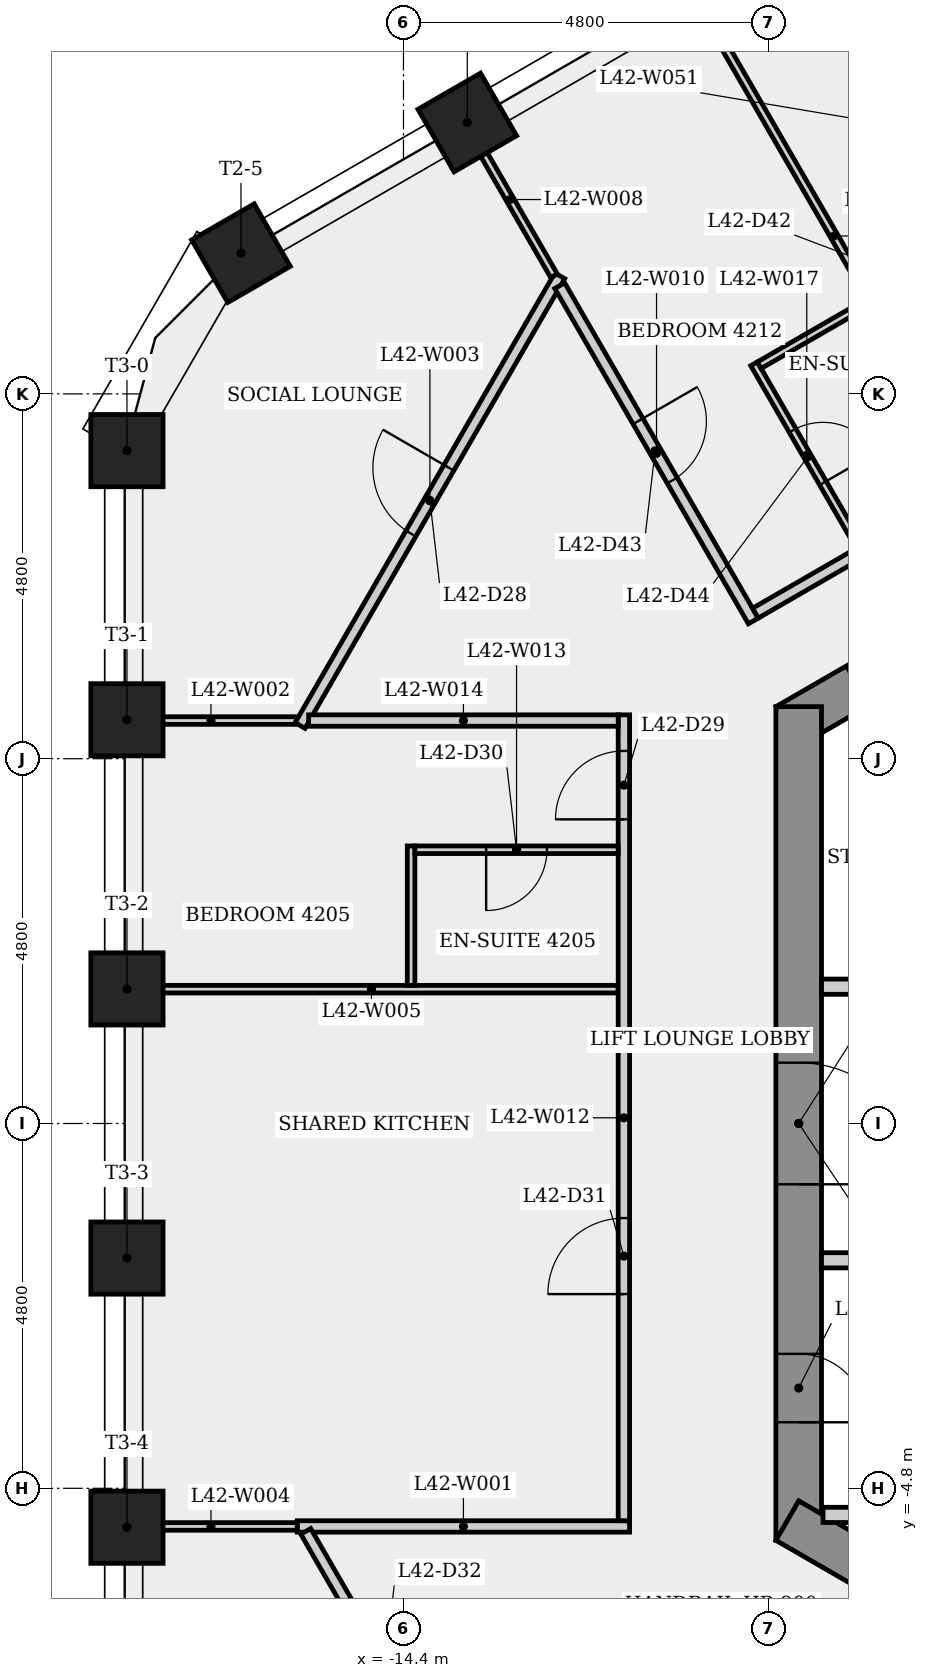
"""IFC4 building model, lengths in metres.
Left out: names, types, materials, properties, quantities, classifications, styles, units other than length and angle.
Written with IfcOpenShell. Run it as: python <this file> out.ifc"""

import sys

from ifc_helpers import new_model, si_unit, direction, frame, frame_2d, origin, origin_2d, place, context, subcontext, project, spatial, rectangle, extrude, element, fill, save


model = new_model("IFC4")
c1 = context("Model", 3, precision=1e-05, world=origin(), true_north=direction((0.0, 1.0)))
c2 = subcontext(c1, "Body", "Model", "MODEL_VIEW")
j1 = project(units=[si_unit("LENGTHUNIT", "METRE"), si_unit("PLANEANGLEUNIT", "RADIAN")], contexts=[c1])
p1 = place(None, origin())
s1 = spatial("IfcSite", under=j1, at=p1, CompositionType="ELEMENT")
p2 = place(p1, origin())
s2 = spatial("IfcBuilding", under=s1, at=p2, CompositionType="ELEMENT")
p3 = place(p2, frame((0.0, 0.0, 159.5)))
s3 = spatial("IfcBuildingStorey", under=s2, at=p3, CompositionType="ELEMENT", Elevation=159.5)
p4 = place(p3, frame((0.15, 10.71, 0.0), z_axis=(0.0, 0.0, 1.0), x_axis=(-0.866023993627, -0.500002442456, 0.0)))
e1 = element("IfcWall", 1, at=p4, inside=s3, PredefinedType="SHEAR", context=c2, shape_type="SweptSolid", body=[
    extrude(rectangle(XDim=10.97, YDim=0.6, at=frame_2d((5.485, 0.0))), origin(), (0.0, 0.0, 1.0), 3.4),
])
p5 = place(p4, frame((9.013, 0.0, 0.0)))
e2 = element("IfcOpeningElement", 2, at=p5, cuts=e1, PredefinedType="OPENING", context=c2, shape_type="SweptSolid", body=[
    extrude(rectangle(XDim=0.9, YDim=2.1, at=frame_2d((0.45, 1.05))), frame((0.0, 0.31, 0.0), z_axis=(0.0, -1.0, 0.0), x_axis=(1.0, 0.0, 0.0)), (0.0, 0.0, 1.0), 0.62),
])
p6 = place(p4, frame((2.437, 0.0, 0.0)))
e3 = element("IfcOpeningElement", 3, at=p6, cuts=e1, PredefinedType="OPENING", context=c2, shape_type="SweptSolid", body=[
    extrude(rectangle(XDim=0.9, YDim=2.1, at=frame_2d((0.45, 1.05))), frame((0.0, 0.31, 0.0), z_axis=(0.0, -1.0, 0.0), x_axis=(1.0, 0.0, 0.0)), (0.0, 0.0, 1.0), 0.62),
])
p7 = place(p3, frame((-9.2, 5.485, 0.0), z_axis=(0.0, 0.0, 1.0), x_axis=(0.0, -1.0, 0.0)))
e4 = element("IfcWall", 4, at=p7, inside=s3, PredefinedType="SHEAR", context=c2, shape_type="SweptSolid", body=[
    extrude(rectangle(XDim=10.97, YDim=0.6, at=frame_2d((5.485, 0.0))), origin(), (0.0, 0.0, 1.0), 3.4),
])
p8 = place(p7, frame((8.516, 0.0, 0.0)))
e5 = element("IfcOpeningElement", 5, at=p8, cuts=e4, PredefinedType="OPENING", context=c2, shape_type="SweptSolid", body=[
    extrude(rectangle(XDim=0.9, YDim=2.1, at=frame_2d((0.45, 1.05))), frame((0.0, 0.31, 0.0), z_axis=(0.0, -1.0, 0.0), x_axis=(1.0, 0.0, 0.0)), (0.0, 0.0, 1.0), 0.62),
])
p9 = place(p7, frame((4.685, 0.0, 0.0)))
e6 = element("IfcOpeningElement", 6, at=p9, cuts=e4, PredefinedType="OPENING", context=c2, shape_type="SweptSolid", body=[
    extrude(rectangle(XDim=1.6, YDim=2.1, at=frame_2d((0.8, 1.05))), frame((0.0, 0.31, 0.0), z_axis=(0.0, -1.0, 0.0), x_axis=(1.0, 0.0, 0.0)), (0.0, 0.0, 1.0), 0.62),
])
p10 = place(p3, frame((-9.35, -5.225, 0.0), z_axis=(0.0, 0.0, 1.0), x_axis=(0.866023993627, -0.500002442456, 0.0)))
e7 = element("IfcWall", 7, at=p10, inside=s3, PredefinedType="SHEAR", context=c2, shape_type="SweptSolid", body=[
    extrude(rectangle(XDim=10.97, YDim=0.6, at=frame_2d((5.485, 0.0))), origin(), (0.0, 0.0, 1.0), 3.4),
])
p11 = place(p10, frame((4.816, 0.0, 0.0)))
e8 = element("IfcOpeningElement", 8, at=p11, cuts=e7, PredefinedType="OPENING", context=c2, shape_type="SweptSolid", body=[
    extrude(rectangle(XDim=0.9, YDim=2.1, at=frame_2d((0.45, 1.05))), frame((0.0, 0.31, 0.0), z_axis=(0.0, -1.0, 0.0), x_axis=(1.0, 0.0, 0.0)), (0.0, 0.0, 1.0), 0.62),
])
for number, where, z_axis, x_axis in (
    (9, (-13.56, 13.171, 0.0), (0.0, 0.0, 1.0), (-0.5, 0.866, 0.0)),
    (10, (-16.538, 11.452, 0.0), (0.0, 0.0, 1.0), (-0.5, 0.866, 0.0)),
    (11, (-18.038, 8.854, 0.0), (0.0, 0.0, 1.0), (-1.0, 0.0, 0.0)),
    (12, (-18.038, 5.312, 0.0), (0.0, 0.0, 1.0), (-1.0, 0.0, 0.0)),
    (13, (-18.038, 1.771, 0.0), (0.0, 0.0, 1.0), (-1.0, 0.0, 0.0)),
    (14, (-18.038, -1.771, 0.0), (0.0, 0.0, 1.0), (-1.0, 0.0, 0.0)),
    (15, (-18.038, -5.312, 0.0), (0.0, 0.0, 1.0), (-1.0, 0.0, 0.0)),
):
    element("IfcColumn", number, at=place(p3, frame(where, z_axis=z_axis, x_axis=x_axis)), inside=s3, PredefinedType="COLUMN", context=c2, shape_type="SweptSolid", body=[
        extrude(rectangle(XDim=0.95, YDim=0.95, at=origin_2d()), origin(), (0.0, 0.0, 1.0), 3.4),
    ])
p12 = place(p3, frame((-15.798, -5.302, 0.0), z_axis=(0.0, 0.0, 1.0), x_axis=(1.0, 0.0, 0.0)))
e16 = element("IfcWall", 16, at=p12, inside=s3, PredefinedType="PARTITIONING", context=c2, shape_type="SweptSolid", body=[
    extrude(rectangle(XDim=4.373, YDim=0.15, at=frame_2d((2.187, 0.0))), origin(), (0.0, 0.0, 1.0), 3.05),
])
p13 = place(p3, frame((-15.798, 5.302, 0.0), z_axis=(0.0, 0.0, 1.0), x_axis=(-1.0, 0.0, 0.0)))
e17 = element("IfcWall", 17, at=p13, inside=s3, PredefinedType="PARTITIONING", context=c2, shape_type="SweptSolid", body=[
    extrude(rectangle(XDim=2.27, YDim=0.1, at=frame_2d((1.135, 0.0))), origin(), (0.0, 0.0, 1.0), 3.05),
])
p14 = place(p3, frame((-15.76, 5.237, 0.0), z_axis=(0.0, 0.0, 1.0), x_axis=(0.500009081712, 0.866020160392, 0.0)))
e18 = element("IfcWall", 18, at=p14, inside=s3, PredefinedType="PARTITIONING", context=c2, shape_type="SweptSolid", body=[
    extrude(rectangle(XDim=6.832, YDim=0.15, at=frame_2d((3.416, 0.0))), origin(), (0.0, 0.0, 1.0), 3.05),
])
p15 = place(p14, frame((2.916, 0.0, 0.0)))
e19 = element("IfcOpeningElement", 19, at=p15, cuts=e18, PredefinedType="OPENING", context=c2, shape_type="SweptSolid", body=[
    extrude(rectangle(XDim=1.0, YDim=2.1, at=frame_2d((0.5, 1.05))), frame((0.0, 0.085, 0.0), z_axis=(0.0, -1.0, 0.0), x_axis=(1.0, 0.0, 0.0)), (0.0, 0.0, 1.0), 0.17),
])
p16 = place(p3, frame((-15.798, -5.302, 0.0), z_axis=(0.0, 0.0, 1.0), x_axis=(-1.0, 0.0, 0.0)))
e20 = element("IfcWall", 20, at=p16, inside=s3, PredefinedType="PARTITIONING", context=c2, shape_type="SweptSolid", body=[
    extrude(rectangle(XDim=2.27, YDim=0.1, at=frame_2d((1.135, 0.0))), origin(), (0.0, 0.0, 1.0), 3.05),
])
p17 = place(p3, frame((-18.068, 1.767, 0.0), z_axis=(0.0, 0.0, 1.0), x_axis=(1.0, 0.0, 0.0)))
e21 = element("IfcWall", 21, at=p17, inside=s3, PredefinedType="PARTITIONING", context=c2, shape_type="SweptSolid", body=[
    extrude(rectangle(XDim=6.493, YDim=0.1, at=frame_2d((3.247, 0.0))), origin(), (0.0, 0.0, 1.0), 3.05),
])
p18 = place(p3, frame((-14.3, 3.652, 0.0), z_axis=(0.0, 0.0, 1.0), x_axis=(0.0, -1.0, 0.0)))
e22 = element("IfcWall", 22, at=p18, inside=s3, PredefinedType="PARTITIONING", context=c2, shape_type="SweptSolid", body=[
    extrude(rectangle(XDim=1.834, YDim=0.1, at=frame_2d((0.917, 0.0))), origin(), (0.0, 0.0, 1.0), 3.05),
])
p19 = place(p3, frame((-13.578, 13.161, 0.0), z_axis=(0.0, 0.0, 1.0), x_axis=(0.500014285048, -0.866017156151, 0.0)))
e23 = element("IfcWall", 23, at=p19, inside=s3, PredefinedType="PARTITIONING", context=c2, shape_type="SweptSolid", body=[
    extrude(rectangle(XDim=2.317, YDim=0.1, at=frame_2d((1.159, 0.0))), origin(), (0.0, 0.0, 1.0), 3.05),
])
p20 = place(p3, frame((-13.611, -8.959, 0.0), z_axis=(0.0, 0.0, 1.0), x_axis=(-0.499994179242, 0.866028764375, 0.0)))
e24 = element("IfcWall", 24, at=p20, inside=s3, PredefinedType="PARTITIONING", context=c2, shape_type="SweptSolid", body=[
    extrude(rectangle(XDim=4.148, YDim=0.15, at=frame_2d((2.074, 0.0))), origin(), (0.0, 0.0, 1.0), 3.05),
])
p21 = place(p20, frame((1.574, 0.0, 0.0)))
e25 = element("IfcOpeningElement", 25, at=p21, cuts=e24, PredefinedType="OPENING", context=c2, shape_type="SweptSolid", body=[
    extrude(rectangle(XDim=1.0, YDim=2.1, at=frame_2d((0.5, 1.05))), frame((0.0, 0.085, 0.0), z_axis=(0.0, -1.0, 0.0), x_axis=(1.0, 0.0, 0.0)), (0.0, 0.0, 1.0), 0.17),
])
p22 = place(p3, frame((-12.344, 11.024, 0.0), z_axis=(0.0, 0.0, 1.0), x_axis=(0.50001008724, -0.866019579835, 0.0)))
e26 = element("IfcWall", 26, at=p22, inside=s3, PredefinedType="PARTITIONING", context=c2, shape_type="SweptSolid", body=[
    extrude(rectangle(XDim=5.094, YDim=0.15, at=frame_2d((2.547, 0.0))), origin(), (0.0, 0.0, 1.0), 3.05),
])
p23 = place(p22, frame((2.06, 0.0, 0.0)))
e27 = element("IfcOpeningElement", 27, at=p23, cuts=e26, PredefinedType="OPENING", context=c2, shape_type="SweptSolid", body=[
    extrude(rectangle(XDim=0.9, YDim=2.1, at=frame_2d((0.45, 1.05))), frame((0.0, 0.085, 0.0), z_axis=(0.0, -1.0, 0.0), x_axis=(1.0, 0.0, 0.0)), (0.0, 0.0, 1.0), 0.17),
])
p24 = place(p3, frame((-11.5, -5.227, 0.0), z_axis=(0.0, 0.0, 1.0), x_axis=(0.0, 1.0, 0.0)))
e28 = element("IfcWall", 28, at=p24, inside=s3, PredefinedType="PARTITIONING", context=c2, shape_type="SweptSolid", body=[
    extrude(rectangle(XDim=10.604, YDim=0.15, at=frame_2d((5.302, 0.0))), origin(), (0.0, 0.0, 1.0), 3.05),
])
p25 = place(p24, frame((9.229, 0.0, 0.0)))
e29 = element("IfcOpeningElement", 29, at=p25, cuts=e28, PredefinedType="OPENING", context=c2, shape_type="SweptSolid", body=[
    extrude(rectangle(XDim=0.9, YDim=2.1, at=frame_2d((0.45, 1.05))), frame((0.0, 0.085, 0.0), z_axis=(0.0, -1.0, 0.0), x_axis=(1.0, 0.0, 0.0)), (0.0, 0.0, 1.0), 0.17),
])
p26 = place(p24, frame((2.982, 0.0, 0.0)))
e30 = element("IfcOpeningElement", 30, at=p26, cuts=e28, PredefinedType="OPENING", context=c2, shape_type="SweptSolid", body=[
    extrude(rectangle(XDim=1.0, YDim=2.1, at=frame_2d((0.5, 1.05))), frame((0.0, 0.085, 0.0), z_axis=(0.0, -1.0, 0.0), x_axis=(1.0, 0.0, 0.0)), (0.0, 0.0, 1.0), 0.17),
])
p27 = place(p3, frame((-11.575, 3.602, 0.0), z_axis=(0.0, 0.0, 1.0), x_axis=(-1.0, 0.0, 0.0)))
e31 = element("IfcWall", 31, at=p27, inside=s3, PredefinedType="PARTITIONING", context=c2, shape_type="SweptSolid", body=[
    extrude(rectangle(XDim=2.675, YDim=0.1, at=frame_2d((1.337, 0.0))), origin(), (0.0, 0.0, 1.0), 3.05),
])
p28 = place(p27, frame((0.938, 0.0, 0.0)))
e32 = element("IfcOpeningElement", 32, at=p28, cuts=e31, PredefinedType="OPENING", context=c2, shape_type="SweptSolid", body=[
    extrude(rectangle(XDim=0.8, YDim=2.1, at=frame_2d((0.4, 1.05))), frame((0.0, 0.06, 0.0), z_axis=(0.0, -1.0, 0.0), x_axis=(1.0, 0.0, 0.0)), (0.0, 0.0, 1.0), 0.12),
])
p29 = place(p3, frame((-11.575, 5.302, 0.0), z_axis=(0.0, 0.0, 1.0), x_axis=(-1.0, 0.0, 0.0)))
e33 = element("IfcWall", 33, at=p29, inside=s3, PredefinedType="PARTITIONING", context=c2, shape_type="SweptSolid", body=[
    extrude(rectangle(XDim=4.073, YDim=0.15, at=frame_2d((2.037, 0.0))), origin(), (0.0, 0.0, 1.0), 3.05),
])
p30 = place(p3, frame((-9.77, 6.715, 0.0), z_axis=(0.0, 0.0, 1.0), x_axis=(0.866022281964, 0.500005407112, 0.0)))
e34 = element("IfcWall", 34, at=p30, inside=s3, PredefinedType="PARTITIONING", context=c2, shape_type="SweptSolid", body=[
    extrude(rectangle(XDim=10.282, YDim=0.15, at=frame_2d((5.141, 0.0))), origin(), (0.0, 0.0, 1.0), 3.05),
])
p31 = place(p30, frame((3.777, 0.0, 0.0)))
e35 = element("IfcOpeningElement", 35, at=p31, cuts=e34, PredefinedType="OPENING", context=c2, shape_type="SweptSolid", body=[
    extrude(rectangle(XDim=0.9, YDim=2.1, at=frame_2d((0.45, 1.05))), frame((0.0, 0.085, 0.0), z_axis=(0.0, -1.0, 0.0), x_axis=(1.0, 0.0, 0.0)), (0.0, 0.0, 1.0), 0.17),
])
p32 = place(p3, frame((-9.788, 9.995, 0.0), z_axis=(0.0, 0.0, 1.0), x_axis=(0.50007530636, -0.865981921271, 0.0)))
e36 = element("IfcWall", 36, at=p32, inside=s3, PredefinedType="PARTITIONING", context=c2, shape_type="SweptSolid", body=[
    extrude(rectangle(XDim=2.775, YDim=0.1, at=frame_2d((1.387, 0.0))), origin(), (0.0, 0.0, 1.0), 3.05),
])
p33 = place(p32, frame((1.012, 0.0, 0.0)))
e37 = element("IfcOpeningElement", 37, at=p33, cuts=e36, PredefinedType="OPENING", context=c2, shape_type="SweptSolid", body=[
    extrude(rectangle(XDim=0.8, YDim=2.1, at=frame_2d((0.4, 1.05))), frame((0.0, 0.06, 0.0), z_axis=(0.0, -1.0, 0.0), x_axis=(1.0, 0.0, 0.0)), (0.0, 0.0, 1.0), 0.12),
])
p34 = place(p3, frame((-8.9, 1.8, 0.0), z_axis=(0.0, 0.0, 1.0), x_axis=(1.0, 0.0, 0.0)))
e38 = element("IfcWall", 38, at=p34, inside=s3, PredefinedType="PARTITIONING", context=c2, shape_type="SweptSolid", body=[
    extrude(rectangle(XDim=1.425, YDim=0.2, at=frame_2d((0.712, 0.0))), origin(), (0.0, 0.0, 1.0), 3.05),
])
p35 = place(p3, frame((-8.88, -5.15, 0.0), z_axis=(0.0, 0.0, 1.0), x_axis=(1.0, 0.0, 0.0)))
e39 = element("IfcWall", 39, at=p35, inside=s3, PredefinedType="PARTITIONING", context=c2, shape_type="SweptSolid", body=[
    extrude(rectangle(XDim=11.205, YDim=0.2, at=frame_2d((5.603, 0.0))), origin(), (0.0, 0.0, 1.0), 3.05),
])
p36 = place(p3, frame((-8.288, 10.803, 0.0), z_axis=(0.0, 0.0, 1.0), x_axis=(-0.866052736899, -0.499952654668, 0.0)))
e40 = element("IfcWall", 40, at=p36, inside=s3, PredefinedType="PARTITIONING", context=c2, shape_type="SweptSolid", body=[
    extrude(rectangle(XDim=1.653, YDim=0.1, at=frame_2d((0.826, 0.0))), origin(), (0.0, 0.0, 1.0), 3.05),
])
p37 = place(p3, frame((-10.588, 14.887, 0.0), z_axis=(0.0, 0.0, 1.0), x_axis=(0.499997136009, -0.866027057304, 0.0)))
e41 = element("IfcWall", 41, at=p37, inside=s3, PredefinedType="PARTITIONING", context=c2, shape_type="SweptSolid", body=[
    extrude(rectangle(XDim=7.412, YDim=0.1, at=frame_2d((3.706, 0.0))), origin(), (0.0, 0.0, 1.0), 3.05),
])
p38 = place(p3, frame((-8.9, -1.8, 0.0), z_axis=(0.0, 0.0, 1.0), x_axis=(1.0, 0.0, 0.0)))
e42 = element("IfcWall", 42, at=p38, inside=s3, PredefinedType="PARTITIONING", context=c2, shape_type="SweptSolid", body=[
    extrude(rectangle(XDim=11.225, YDim=0.2, at=frame_2d((5.613, 0.0))), origin(), (0.0, 0.0, 1.0), 3.05),
])
p39 = place(p38, frame((2.135, 0.0, 0.0)))
e43 = element("IfcOpeningElement", 43, at=p39, cuts=e42, PredefinedType="OPENING", context=c2, shape_type="SweptSolid", body=[
    extrude(rectangle(XDim=0.9, YDim=2.1, at=frame_2d((0.45, 1.05))), frame((0.0, 0.11, 0.0), z_axis=(0.0, -1.0, 0.0), x_axis=(1.0, 0.0, 0.0)), (0.0, 0.0, 1.0), 0.22),
])
p40 = place(p38, frame((6.61, 0.0, 0.0)))
e44 = element("IfcOpeningElement", 44, at=p40, cuts=e42, PredefinedType="OPENING", context=c2, shape_type="SweptSolid", body=[
    extrude(rectangle(XDim=0.9, YDim=2.1, at=frame_2d((0.45, 1.05))), frame((0.0, 0.11, 0.0), z_axis=(0.0, -1.0, 0.0), x_axis=(1.0, 0.0, 0.0)), (0.0, 0.0, 1.0), 0.22),
])
p41 = place(p38, frame((9.613, 0.0, 0.0)))
e45 = element("IfcOpeningElement", 45, at=p41, cuts=e42, PredefinedType="OPENING", context=c2, shape_type="SweptSolid", body=[
    extrude(rectangle(XDim=0.9, YDim=2.1, at=frame_2d((0.45, 1.05))), frame((0.0, 0.11, 0.0), z_axis=(0.0, -1.0, 0.0), x_axis=(1.0, 0.0, 0.0)), (0.0, 0.0, 1.0), 0.22),
])
p42 = place(p15, origin())
e46 = element("IfcDoor", 46, at=p42, inside=s3, OperationType="SINGLE_SWING_RIGHT", PredefinedType="DOOR", context=c2, shape_type="SweptSolid", body=[
    extrude(rectangle(XDim=1.0, YDim=2.1, at=frame_2d((0.5, 1.05))), frame((0.0, 0.025, 0.0), z_axis=(0.0, -1.0, 0.0), x_axis=(1.0, 0.0, 0.0)), (0.0, 0.0, 1.0), 0.05),
])
fill(e19, e46)
p43 = place(p25, origin())
e47 = element("IfcDoor", 47, at=p43, inside=s3, OperationType="SINGLE_SWING_LEFT", PredefinedType="DOOR", context=c2, shape_type="SweptSolid", body=[
    extrude(rectangle(XDim=0.9, YDim=2.1, at=frame_2d((0.45, 1.05))), frame((0.0, 0.025, 0.0), z_axis=(0.0, -1.0, 0.0), x_axis=(1.0, 0.0, 0.0)), (0.0, 0.0, 1.0), 0.05),
])
fill(e29, e47)
p44 = place(p28, origin())
e48 = element("IfcDoor", 48, at=p44, inside=s3, OperationType="SINGLE_SWING_RIGHT", PredefinedType="DOOR", context=c2, shape_type="SweptSolid", body=[
    extrude(rectangle(XDim=0.8, YDim=2.1, at=frame_2d((0.4, 1.05))), frame((0.0, 0.025, 0.0), z_axis=(0.0, -1.0, 0.0), x_axis=(1.0, 0.0, 0.0)), (0.0, 0.0, 1.0), 0.05),
])
fill(e32, e48)
p45 = place(p26, origin())
e49 = element("IfcDoor", 49, at=p45, inside=s3, OperationType="SINGLE_SWING_LEFT", PredefinedType="DOOR", context=c2, shape_type="SweptSolid", body=[
    extrude(rectangle(XDim=1.0, YDim=2.1, at=frame_2d((0.5, 1.05))), frame((0.0, 0.025, 0.0), z_axis=(0.0, -1.0, 0.0), x_axis=(1.0, 0.0, 0.0)), (0.0, 0.0, 1.0), 0.05),
])
fill(e30, e49)
p46 = place(p23, origin())
e50 = element("IfcDoor", 50, at=p46, inside=s3, OperationType="SINGLE_SWING_LEFT", PredefinedType="DOOR", context=c2, shape_type="SweptSolid", body=[
    extrude(rectangle(XDim=0.9, YDim=2.1, at=frame_2d((0.45, 1.05))), frame((0.0, 0.025, 0.0), z_axis=(0.0, -1.0, 0.0), x_axis=(1.0, 0.0, 0.0)), (0.0, 0.0, 1.0), 0.05),
])
fill(e27, e50)
p47 = place(p33, origin())
e51 = element("IfcDoor", 51, at=p47, inside=s3, OperationType="SINGLE_SWING_RIGHT", PredefinedType="DOOR", context=c2, shape_type="SweptSolid", body=[
    extrude(rectangle(XDim=0.8, YDim=2.1, at=frame_2d((0.4, 1.05))), frame((0.0, 0.025, 0.0), z_axis=(0.0, -1.0, 0.0), x_axis=(1.0, 0.0, 0.0)), (0.0, 0.0, 1.0), 0.05),
])
fill(e37, e51)
p48 = place(p8, origin())
e52 = element("IfcDoor", 52, at=p48, inside=s3, OperationType="SINGLE_SWING_RIGHT", PredefinedType="DOOR", context=c2, shape_type="SweptSolid", body=[
    extrude(rectangle(XDim=0.9, YDim=2.1, at=frame_2d((0.45, 1.05))), frame((0.0, 0.025, 0.0), z_axis=(0.0, -1.0, 0.0), x_axis=(1.0, 0.0, 0.0)), (0.0, 0.0, 1.0), 0.05),
])
fill(e5, e52)
p49 = place(p9, origin())
e53 = element("IfcDoor", 53, at=p49, inside=s3, OperationType="SINGLE_SWING_RIGHT", PredefinedType="DOOR", context=c2, shape_type="SweptSolid", body=[
    extrude(rectangle(XDim=1.6, YDim=2.1, at=frame_2d((0.8, 1.05))), frame((0.0, 0.025, 0.0), z_axis=(0.0, -1.0, 0.0), x_axis=(1.0, 0.0, 0.0)), (0.0, 0.0, 1.0), 0.05),
])
fill(e6, e53)
save(model, sys.argv[1])
